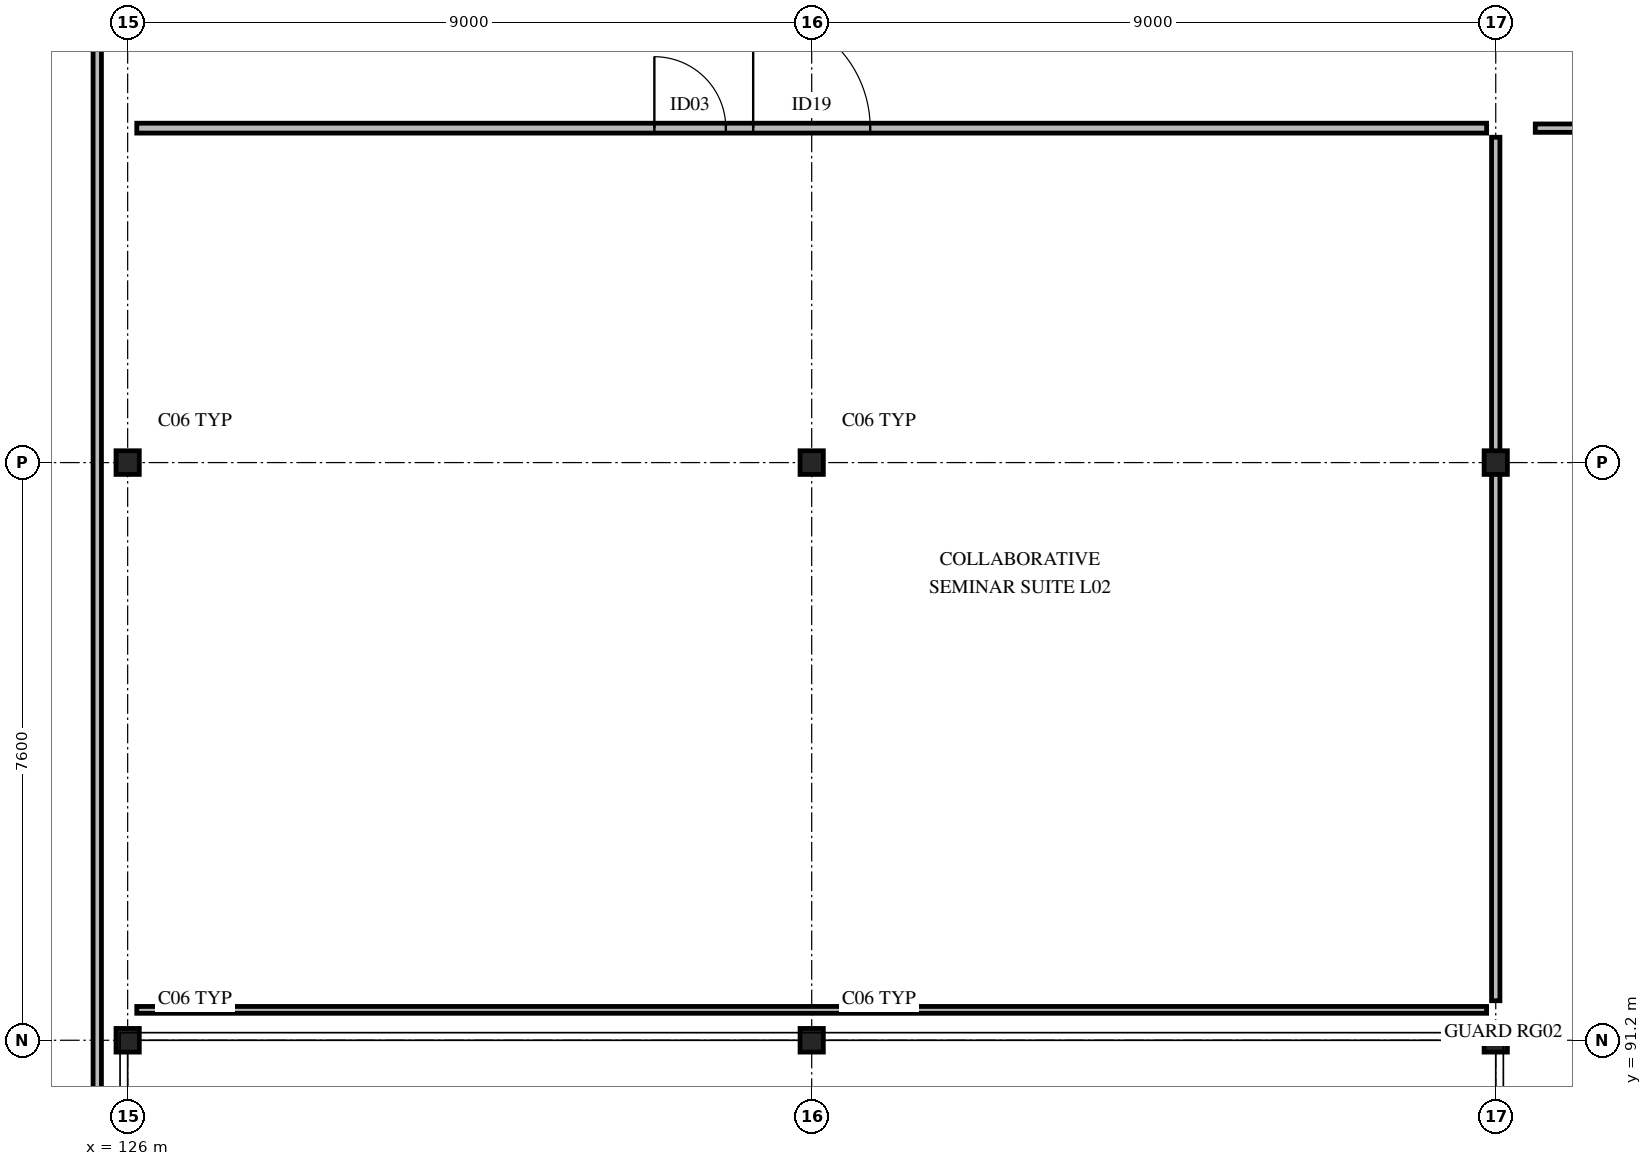
"""IFC4 building model, lengths in metres.
Left out: names, types, materials, properties, quantities, classifications, styles, units other than length and angle.
Written with IfcOpenShell. Run it as: python <this file> out.ifc"""

import sys

from ifc_helpers import new_model, si_unit, direction, frame, frame_2d, origin, origin_2d, place, context, subcontext, project, spatial, rectangle, i_section, extrude, element, fill, save


model = new_model("IFC4")
c1 = context("Model", 3, precision=1e-05, world=origin(), true_north=direction((0.0, 1.0)))
c2 = subcontext(c1, "Body", "Model", "MODEL_VIEW")
j1 = project(units=[si_unit("LENGTHUNIT", "METRE"), si_unit("PLANEANGLEUNIT", "RADIAN")], contexts=[c1])
p1 = place(None, origin())
s1 = spatial("IfcSite", under=j1, at=p1, CompositionType="ELEMENT")
p2 = place(p1, origin())
s2 = spatial("IfcBuilding", under=s1, at=p2, CompositionType="ELEMENT")
p3 = place(p2, frame((0.0, 0.0, 9.36)))
s3 = spatial("IfcBuildingStorey", under=s2, at=p3, CompositionType="ELEMENT", Elevation=9.36)
for number, where, z_axis, x_axis in (
    (1, (126.0, 91.2, 0.0), (0.0, 0.0, 1.0), (1.0, 0.0, 0.0)),
    (2, (126.0, 98.8, 0.0), (0.0, 0.0, 1.0), (1.0, 0.0, 0.0)),
    (3, (135.0, 91.2, 0.0), (0.0, 0.0, 1.0), (1.0, 0.0, 0.0)),
    (4, (135.0, 98.8, 0.0), (0.0, 0.0, 1.0), (1.0, 0.0, 0.0)),
    (5, (144.0, 91.2, 0.0), (0.0, 0.0, 1.0), (1.0, 0.0, 0.0)),
    (6, (144.0, 98.8, 0.0), (0.0, 0.0, 1.0), (1.0, 0.0, 0.0)),
):
    element("IfcColumn", number, at=place(p3, frame(where, z_axis=z_axis, x_axis=x_axis)), inside=s3, PredefinedType="COLUMN", context=c2, shape_type="SweptSolid", body=[
        extrude(i_section(OverallWidth=0.306, OverallDepth=0.311, WebThickness=0.011, FlangeThickness=0.017, FilletRadius=0.015, at=origin_2d()), origin(), (0.0, 0.0, 1.0), 4.32),
    ])
p4 = place(p3, frame((125.6, 76.12, 0.0), z_axis=(0.0, 0.0, 1.0), x_axis=(0.0, 1.0, 0.0)))
e7 = element("IfcWall", 7, at=p4, inside=s3, PredefinedType="PARTITIONING", context=c2, shape_type="SweptSolid", body=[
    extrude(rectangle(XDim=29.76, YDim=0.11, at=frame_2d((14.88, 0.0))), origin(), (0.0, 0.0, 1.0), 4.04),
])
p5 = place(p4, frame((12.55, 0.0, 0.0)))
e8 = element("IfcOpeningElement", 8, at=p5, cuts=e7, PredefinedType="OPENING", context=c2, shape_type="SweptSolid", body=[
    extrude(rectangle(XDim=1.46, YDim=2.1, at=frame_2d((0.73, 1.05))), frame((0.0, 0.065, 0.0), z_axis=(0.0, -1.0, 0.0), x_axis=(1.0, 0.0, 0.0)), (0.0, 0.0, 1.0), 0.13),
])
p6 = place(p3, frame((126.12, 103.2, 0.0), z_axis=(0.0, 0.0, 1.0), x_axis=(1.0, 0.0, 0.0)))
e9 = element("IfcWall", 9, at=p6, inside=s3, PredefinedType="PARTITIONING", context=c2, shape_type="SweptSolid", body=[
    extrude(rectangle(XDim=17.76, YDim=0.13, at=frame_2d((8.88, 0.0))), origin(), (0.0, 0.0, 1.0), 4.04),
])
p7 = place(p6, frame((8.11, 0.0, 0.0)))
e10 = element("IfcOpeningElement", 10, at=p7, cuts=e9, PredefinedType="OPENING", context=c2, shape_type="SweptSolid", body=[
    extrude(rectangle(XDim=1.54, YDim=2.1, at=frame_2d((0.77, 1.05))), frame((0.0, 0.075, 0.0), z_axis=(0.0, -1.0, 0.0), x_axis=(1.0, 0.0, 0.0)), (0.0, 0.0, 1.0), 0.15),
])
p8 = place(p6, frame((6.81, 0.0, 0.0)))
e11 = element("IfcOpeningElement", 11, at=p8, cuts=e9, PredefinedType="OPENING", context=c2, shape_type="SweptSolid", body=[
    extrude(rectangle(XDim=0.94, YDim=2.06, at=frame_2d((0.47, 1.03))), frame((0.0, 0.075, 0.0), z_axis=(0.0, -1.0, 0.0), x_axis=(1.0, 0.0, 0.0)), (0.0, 0.0, 1.0), 0.15),
])
p9 = place(p3, frame((144.0, 91.72, 0.0), z_axis=(0.0, 0.0, 1.0), x_axis=(0.0, 1.0, 0.0)))
e12 = element("IfcWall", 12, at=p9, inside=s3, PredefinedType="PARTITIONING", context=c2, shape_type="SweptSolid", body=[
    extrude(rectangle(XDim=11.36, YDim=0.11, at=frame_2d((5.68, 0.0))), origin(), (0.0, 0.0, 1.0), 3.631),
])
p10 = place(p3, frame((126.12, 91.6, 0.0), z_axis=(0.0, 0.0, 1.0), x_axis=(1.0, 0.0, 0.0)))
e13 = element("IfcWall", 13, at=p10, inside=s3, PredefinedType="PARTITIONING", context=c2, shape_type="SweptSolid", body=[
    extrude(rectangle(XDim=17.76, YDim=0.09, at=frame_2d((8.88, 0.0))), origin(), (0.0, 0.0, 1.0), 4.04),
])
p11 = place(p3, frame((144.52, 103.2, 0.0), z_axis=(0.0, 0.0, 1.0), x_axis=(1.0, 0.0, 0.0)))
e14 = element("IfcWall", 14, at=p11, inside=s3, PredefinedType="PARTITIONING", context=c2, shape_type="SweptSolid", body=[
    extrude(rectangle(XDim=2.56, YDim=0.11, at=frame_2d((1.28, 0.0))), origin(), (0.0, 0.0, 1.0), 4.04),
])
p12 = place(p11, frame((0.675, 0.0, 0.0)))
e15 = element("IfcOpeningElement", 15, at=p12, cuts=e14, PredefinedType="OPENING", context=c2, shape_type="SweptSolid", body=[
    extrude(rectangle(XDim=1.21, YDim=2.15, at=frame_2d((0.605, 1.075))), frame((0.0, 0.065, 0.0), z_axis=(0.0, -1.0, 0.0), x_axis=(1.0, 0.0, 0.0)), (0.0, 0.0, 1.0), 0.13),
])
p13 = place(p7, origin())
e16 = element("IfcDoor", 16, at=p13, inside=s3, OperationType="SINGLE_SWING_LEFT", PredefinedType="DOOR", context=c2, shape_type="SweptSolid", body=[
    extrude(rectangle(XDim=1.54, YDim=2.1, at=frame_2d((0.77, 1.05))), frame((0.0, 0.025, 0.0), z_axis=(0.0, -1.0, 0.0), x_axis=(1.0, 0.0, 0.0)), (0.0, 0.0, 1.0), 0.05),
])
fill(e10, e16)
p14 = place(p8, origin())
e17 = element("IfcDoor", 17, at=p14, inside=s3, OperationType="SINGLE_SWING_LEFT", PredefinedType="DOOR", context=c2, shape_type="SweptSolid", body=[
    extrude(rectangle(XDim=0.94, YDim=2.06, at=frame_2d((0.47, 1.03))), frame((0.0, 0.025, 0.0), z_axis=(0.0, -1.0, 0.0), x_axis=(1.0, 0.0, 0.0)), (0.0, 0.0, 1.0), 0.05),
])
fill(e11, e17)
save(model, sys.argv[1])
